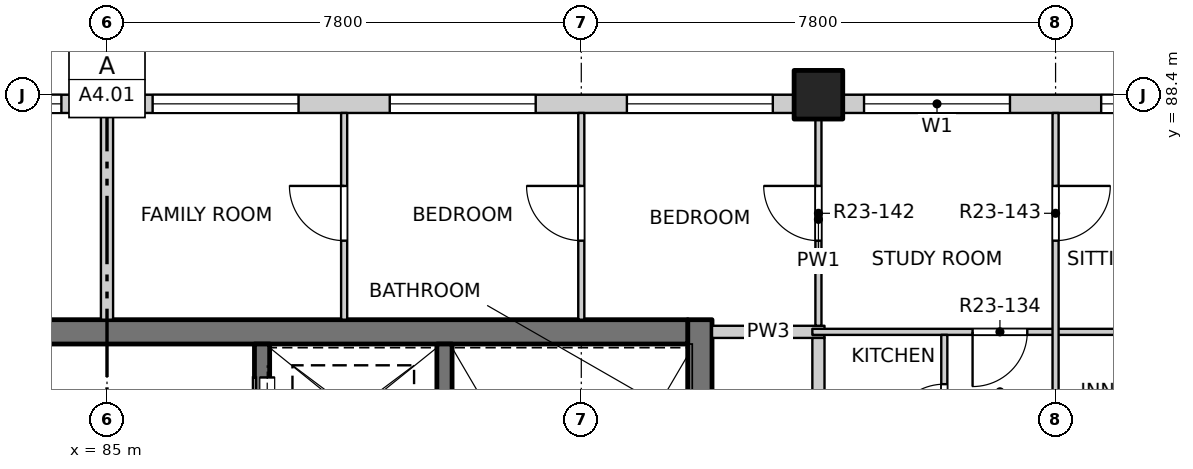
"""IFC4 building model, lengths in metres.
Left out: names, types, materials, properties, quantities, classifications, styles, units other than length and angle.
Written with IfcOpenShell. Run it as: python <this file> out.ifc"""

import sys

from ifc_helpers import new_model, si_unit, direction, frame, frame_2d, origin, origin_2d, place, context, subcontext, project, spatial, rectangle, extrude, element, fill, save


model = new_model("IFC4")
c1 = context("Model", 3, precision=1e-05, world=origin(), true_north=direction((0.0, 1.0)))
c2 = subcontext(c1, "Body", "Model", "MODEL_VIEW")
j1 = project(units=[si_unit("LENGTHUNIT", "METRE"), si_unit("PLANEANGLEUNIT", "RADIAN")], contexts=[c1])
p1 = place(None, origin())
s1 = spatial("IfcSite", under=j1, at=p1, CompositionType="ELEMENT")
p2 = place(p1, origin())
s2 = spatial("IfcBuilding", under=s1, at=p2, CompositionType="ELEMENT")
p3 = place(p2, frame((0.0, 0.0, 234.7)))
s3 = spatial("IfcBuildingStorey", under=s2, at=p3, CompositionType="ELEMENT", Elevation=234.7)
p4 = place(p3, frame((96.7, 88.4, -0.25), z_axis=(0.0, 0.0, 1.0), x_axis=(1.0, 0.0, 0.0)))
e1 = element("IfcColumn", 1, at=p4, inside=s3, PredefinedType="COLUMN", context=c2, shape_type="SweptSolid", body=[
    extrude(rectangle(XDim=0.8, YDim=0.8, at=origin_2d()), origin(), (0.0, 0.0, 1.0), 3.4),
])
p5 = place(p3, frame((94.75, 77.3, -0.25), z_axis=(0.0, 0.0, 1.0), x_axis=(0.0, 1.0, 0.0)))
e2 = element("IfcWall", 2, at=p5, inside=s3, PredefinedType="SOLIDWALL", context=c2, shape_type="SweptSolid", body=[
    extrude(rectangle(XDim=7.4, YDim=0.4, at=frame_2d((3.7, 0.0))), origin(), (0.0, 0.0, 1.0), 3.4),
])
p6 = place(p5, frame((0.3, 0.0, 0.25)))
e3 = element("IfcOpeningElement", 3, at=p6, cuts=e2, PredefinedType="OPENING", context=c2, shape_type="SweptSolid", body=[
    extrude(rectangle(XDim=1.2, YDim=2.1, at=frame_2d((0.6, 1.05))), frame((0.0, 0.21, 0.0), z_axis=(0.0, -1.0, 0.0), x_axis=(1.0, 0.0, 0.0)), (0.0, 0.0, 1.0), 0.42),
])
p7 = place(p3, frame((75.45, 84.5, -0.25), z_axis=(0.0, 0.0, 1.0), x_axis=(1.0, 0.0, 0.0)))
e4 = element("IfcWall", 4, at=p7, inside=s3, PredefinedType="SOLIDWALL", context=c2, shape_type="SweptSolid", body=[
    extrude(rectangle(XDim=19.1, YDim=0.4, at=frame_2d((9.55, 0.0))), origin(), (0.0, 0.0, 1.0), 3.4),
])
p8 = place(p3, frame((90.55, 77.3, -0.25), z_axis=(0.0, 0.0, 1.0), x_axis=(0.0, 1.0, 0.0)))
e5 = element("IfcWall", 5, at=p8, inside=s3, PredefinedType="SOLIDWALL", context=c2, shape_type="SweptSolid", body=[
    extrude(rectangle(XDim=7.0, YDim=0.25, at=frame_2d((3.5, 0.0))), origin(), (0.0, 0.0, 1.0), 3.4),
])
p9 = place(p3, frame((87.55, 82.025, -0.25), z_axis=(0.0, 0.0, 1.0), x_axis=(0.0, 1.0, 0.0)))
e6 = element("IfcWall", 6, at=p9, inside=s3, PredefinedType="SOLIDWALL", context=c2, shape_type="SweptSolid", body=[
    extrude(rectangle(XDim=2.275, YDim=0.25, at=frame_2d((1.138, 0.0))), origin(), (0.0, 0.0, 1.0), 3.4),
])
p10 = place(p9, frame((0.625, 0.0, 0.25)))
e7 = element("IfcOpeningElement", 7, at=p10, cuts=e6, PredefinedType="OPENING", context=c2, shape_type="SweptSolid", body=[
    extrude(rectangle(XDim=1.1, YDim=2.1, at=frame_2d((0.55, 1.05))), frame((0.0, 0.135, 0.0), z_axis=(0.0, -1.0, 0.0), x_axis=(1.0, 0.0, 0.0)), (0.0, 0.0, 1.0), 0.27),
])
p11 = place(p3, frame((73.7, 88.25, 0.0), z_axis=(0.0, 0.0, 1.0), x_axis=(1.0, 0.0, 0.0)))
e8 = element("IfcWall", 8, at=p11, inside=s3, PredefinedType="SOLIDWALL", context=c2, shape_type="SweptSolid", body=[
    extrude(rectangle(XDim=22.6, YDim=0.3, at=frame_2d((11.3, 0.0))), origin(), (0.0, 0.0, 1.0), 2.7),
])
p12 = place(p11, frame((0.35, 0.0, 0.9)))
e9 = element("IfcOpeningElement", 9, at=p12, cuts=e8, PredefinedType="OPENING", context=c2, shape_type="SweptSolid", body=[
    extrude(rectangle(XDim=2.4, YDim=1.8, at=frame_2d((1.2, 0.9))), frame((0.0, 0.16, 0.0), z_axis=(0.0, -1.0, 0.0), x_axis=(1.0, 0.0, 0.0)), (0.0, 0.0, 1.0), 0.32),
])
p13 = place(p11, frame((4.25, 0.0, 0.9)))
e10 = element("IfcOpeningElement", 10, at=p13, cuts=e8, PredefinedType="OPENING", context=c2, shape_type="SweptSolid", body=[
    extrude(rectangle(XDim=2.4, YDim=1.8, at=frame_2d((1.2, 0.9))), frame((0.0, 0.16, 0.0), z_axis=(0.0, -1.0, 0.0), x_axis=(1.0, 0.0, 0.0)), (0.0, 0.0, 1.0), 0.32),
])
p14 = place(p11, frame((8.15, 0.0, 0.9)))
e11 = element("IfcOpeningElement", 11, at=p14, cuts=e8, PredefinedType="OPENING", context=c2, shape_type="SweptSolid", body=[
    extrude(rectangle(XDim=2.4, YDim=1.8, at=frame_2d((1.2, 0.9))), frame((0.0, 0.16, 0.0), z_axis=(0.0, -1.0, 0.0), x_axis=(1.0, 0.0, 0.0)), (0.0, 0.0, 1.0), 0.32),
])
p15 = place(p11, frame((12.05, 0.0, 0.9)))
e12 = element("IfcOpeningElement", 12, at=p15, cuts=e8, PredefinedType="OPENING", context=c2, shape_type="SweptSolid", body=[
    extrude(rectangle(XDim=2.4, YDim=1.8, at=frame_2d((1.2, 0.9))), frame((0.0, 0.16, 0.0), z_axis=(0.0, -1.0, 0.0), x_axis=(1.0, 0.0, 0.0)), (0.0, 0.0, 1.0), 0.32),
])
p16 = place(p11, frame((15.95, 0.0, 0.9)))
e13 = element("IfcOpeningElement", 13, at=p16, cuts=e8, PredefinedType="OPENING", context=c2, shape_type="SweptSolid", body=[
    extrude(rectangle(XDim=2.4, YDim=1.8, at=frame_2d((1.2, 0.9))), frame((0.0, 0.16, 0.0), z_axis=(0.0, -1.0, 0.0), x_axis=(1.0, 0.0, 0.0)), (0.0, 0.0, 1.0), 0.32),
])
p17 = place(p11, frame((19.85, 0.0, 0.9)))
e14 = element("IfcOpeningElement", 14, at=p17, cuts=e8, PredefinedType="OPENING", context=c2, shape_type="SweptSolid", body=[
    extrude(rectangle(XDim=2.4, YDim=1.8, at=frame_2d((1.2, 0.9))), frame((0.0, 0.16, 0.0), z_axis=(0.0, -1.0, 0.0), x_axis=(1.0, 0.0, 0.0)), (0.0, 0.0, 1.0), 0.32),
])
p18 = place(p3, frame((97.1, 88.25, 0.0), z_axis=(0.0, 0.0, 1.0), x_axis=(1.0, 0.0, 0.0)))
e15 = element("IfcWall", 15, at=p18, inside=s3, PredefinedType="SOLIDWALL", context=c2, shape_type="SweptSolid", body=[
    extrude(rectangle(XDim=7.4, YDim=0.3, at=frame_2d((3.7, 0.0))), origin(), (0.0, 0.0, 1.0), 2.7),
])
p19 = place(p18, frame((0.35, 0.0, 0.9)))
e16 = element("IfcOpeningElement", 16, at=p19, cuts=e15, PredefinedType="OPENING", context=c2, shape_type="SweptSolid", body=[
    extrude(rectangle(XDim=2.4, YDim=1.8, at=frame_2d((1.2, 0.9))), frame((0.0, 0.16, 0.0), z_axis=(0.0, -1.0, 0.0), x_axis=(1.0, 0.0, 0.0)), (0.0, 0.0, 1.0), 0.32),
])
p20 = place(p18, frame((4.25, 0.0, 0.9)))
e17 = element("IfcOpeningElement", 17, at=p20, cuts=e15, PredefinedType="OPENING", context=c2, shape_type="SweptSolid", body=[
    extrude(rectangle(XDim=2.4, YDim=1.8, at=frame_2d((1.2, 0.9))), frame((0.0, 0.16, 0.0), z_axis=(0.0, -1.0, 0.0), x_axis=(1.0, 0.0, 0.0)), (0.0, 0.0, 1.0), 0.32),
])
p21 = place(p3, frame((94.95, 84.5, 0.0), z_axis=(0.0, 0.0, 1.0), x_axis=(1.0, 0.0, 0.0)))
e18 = element("IfcWall", 18, at=p21, inside=s3, PredefinedType="PARTITIONING", context=c2, shape_type="SweptSolid", body=[
    extrude(rectangle(XDim=1.85, YDim=0.2, at=frame_2d((0.925, 0.0))), origin(), (0.0, 0.0, 1.0), 3.15),
])
p22 = place(p3, frame((96.6, 84.5, 0.0), z_axis=(0.0, 0.0, 1.0), x_axis=(1.0, 0.0, 0.0)))
e19 = element("IfcWall", 19, at=p22, inside=s3, PredefinedType="PARTITIONING", context=c2, shape_type="SweptSolid", body=[
    extrude(rectangle(XDim=11.5, YDim=0.1, at=frame_2d((5.75, 0.0))), origin(), (0.0, 0.0, 1.0), 3.15),
])
p23 = place(p22, frame((2.635, 0.0, 0.0)))
e20 = element("IfcOpeningElement", 20, at=p23, cuts=e19, PredefinedType="OPENING", context=c2, shape_type="SweptSolid", body=[
    extrude(rectangle(XDim=0.9, YDim=2.1, at=frame_2d((0.45, 1.05))), frame((0.0, 0.06, 0.0), z_axis=(0.0, -1.0, 0.0), x_axis=(1.0, 0.0, 0.0)), (0.0, 0.0, 1.0), 0.12),
])
p24 = place(p3, frame((85.0, 84.7, 0.0), z_axis=(0.0, 0.0, 1.0), x_axis=(0.0, 1.0, 0.0)))
e21 = element("IfcWall", 21, at=p24, inside=s3, PredefinedType="PARTITIONING", context=c2, shape_type="SweptSolid", body=[
    extrude(rectangle(XDim=3.4, YDim=0.2, at=frame_2d((1.7, 0.0))), origin(), (0.0, 0.0, 1.0), 3.15),
])
p25 = place(p3, frame((88.9, 84.7, 0.0), z_axis=(0.0, 0.0, 1.0), x_axis=(0.0, 1.0, 0.0)))
e22 = element("IfcWall", 22, at=p25, inside=s3, PredefinedType="PARTITIONING", context=c2, shape_type="SweptSolid", body=[
    extrude(rectangle(XDim=3.4, YDim=0.1, at=frame_2d((1.7, 0.0))), origin(), (0.0, 0.0, 1.0), 3.15),
])
p26 = place(p25, frame((1.3, 0.0, 0.0)))
e23 = element("IfcOpeningElement", 23, at=p26, cuts=e22, PredefinedType="OPENING", context=c2, shape_type="SweptSolid", body=[
    extrude(rectangle(XDim=0.9, YDim=2.1, at=frame_2d((0.45, 1.05))), frame((0.0, 0.06, 0.0), z_axis=(0.0, -1.0, 0.0), x_axis=(1.0, 0.0, 0.0)), (0.0, 0.0, 1.0), 0.12),
])
p27 = place(p3, frame((92.8, 84.7, 0.0), z_axis=(0.0, 0.0, 1.0), x_axis=(0.0, 1.0, 0.0)))
e24 = element("IfcWall", 24, at=p27, inside=s3, PredefinedType="PARTITIONING", context=c2, shape_type="SweptSolid", body=[
    extrude(rectangle(XDim=3.4, YDim=0.1, at=frame_2d((1.7, 0.0))), origin(), (0.0, 0.0, 1.0), 3.15),
])
p28 = place(p27, frame((1.3, 0.0, 0.0)))
e25 = element("IfcOpeningElement", 25, at=p28, cuts=e24, PredefinedType="OPENING", context=c2, shape_type="SweptSolid", body=[
    extrude(rectangle(XDim=0.9, YDim=2.1, at=frame_2d((0.45, 1.05))), frame((0.0, 0.06, 0.0), z_axis=(0.0, -1.0, 0.0), x_axis=(1.0, 0.0, 0.0)), (0.0, 0.0, 1.0), 0.12),
])
p29 = place(p3, frame((96.7, 49.5, 0.0), z_axis=(0.0, 0.0, 1.0), x_axis=(0.0, 1.0, 0.0)))
e26 = element("IfcWall", 26, at=p29, inside=s3, PredefinedType="PARTITIONING", context=c2, shape_type="SweptSolid", body=[
    extrude(rectangle(XDim=34.9, YDim=0.2, at=frame_2d((17.45, 0.0))), origin(), (0.0, 0.0, 1.0), 3.15),
])
p30 = place(p29, frame((3.175, 0.0, 0.0)))
e27 = element("IfcOpeningElement", 27, at=p30, cuts=e26, PredefinedType="OPENING", context=c2, shape_type="SweptSolid", body=[
    extrude(rectangle(XDim=1.0, YDim=2.1, at=frame_2d((0.5, 1.05))), frame((0.0, 0.11, 0.0), z_axis=(0.0, -1.0, 0.0), x_axis=(1.0, 0.0, 0.0)), (0.0, 0.0, 1.0), 0.22),
])
p31 = place(p29, frame((14.625, 0.0, 0.0)))
e28 = element("IfcOpeningElement", 28, at=p31, cuts=e26, PredefinedType="OPENING", context=c2, shape_type="SweptSolid", body=[
    extrude(rectangle(XDim=1.0, YDim=2.1, at=frame_2d((0.5, 1.05))), frame((0.0, 0.11, 0.0), z_axis=(0.0, -1.0, 0.0), x_axis=(1.0, 0.0, 0.0)), (0.0, 0.0, 1.0), 0.22),
])
p32 = place(p29, frame((30.175, 0.0, 0.0)))
e29 = element("IfcOpeningElement", 29, at=p32, cuts=e26, PredefinedType="OPENING", context=c2, shape_type="SweptSolid", body=[
    extrude(rectangle(XDim=1.0, YDim=2.1, at=frame_2d((0.5, 1.05))), frame((0.0, 0.11, 0.0), z_axis=(0.0, -1.0, 0.0), x_axis=(1.0, 0.0, 0.0)), (0.0, 0.0, 1.0), 0.22),
])
p33 = place(p3, frame((96.7, 84.6, 0.0), z_axis=(0.0, 0.0, 1.0), x_axis=(0.0, 1.0, 0.0)))
e30 = element("IfcWall", 30, at=p33, inside=s3, PredefinedType="PARTITIONING", context=c2, shape_type="SweptSolid", body=[
    extrude(rectangle(XDim=3.5, YDim=0.1, at=frame_2d((1.75, 0.0))), origin(), (0.0, 0.0, 1.0), 3.15),
])
p34 = place(p33, frame((1.4, 0.0, 0.0)))
e31 = element("IfcOpeningElement", 31, at=p34, cuts=e30, PredefinedType="OPENING", context=c2, shape_type="SweptSolid", body=[
    extrude(rectangle(XDim=0.9, YDim=2.1, at=frame_2d((0.45, 1.05))), frame((0.0, 0.06, 0.0), z_axis=(0.0, -1.0, 0.0), x_axis=(1.0, 0.0, 0.0)), (0.0, 0.0, 1.0), 0.12),
])
p35 = place(p3, frame((98.77, 79.55, 0.0), z_axis=(0.0, 0.0, 1.0), x_axis=(0.0, 1.0, 0.0)))
e32 = element("IfcWall", 32, at=p35, inside=s3, PredefinedType="PARTITIONING", context=c2, shape_type="SweptSolid", body=[
    extrude(rectangle(XDim=4.9, YDim=0.1, at=frame_2d((2.45, 0.0))), origin(), (0.0, 0.0, 1.0), 3.15),
])
p36 = place(p35, frame((0.69, 0.0, 0.0)))
e33 = element("IfcOpeningElement", 33, at=p36, cuts=e32, PredefinedType="OPENING", context=c2, shape_type="SweptSolid", body=[
    extrude(rectangle(XDim=0.9, YDim=2.1, at=frame_2d((0.45, 1.05))), frame((0.0, 0.06, 0.0), z_axis=(0.0, -1.0, 0.0), x_axis=(1.0, 0.0, 0.0)), (0.0, 0.0, 1.0), 0.12),
])
p37 = place(p35, frame((3.19, 0.0, 0.0)))
e34 = element("IfcOpeningElement", 34, at=p37, cuts=e32, PredefinedType="OPENING", context=c2, shape_type="SweptSolid", body=[
    extrude(rectangle(XDim=0.9, YDim=2.1, at=frame_2d((0.45, 1.05))), frame((0.0, 0.06, 0.0), z_axis=(0.0, -1.0, 0.0), x_axis=(1.0, 0.0, 0.0)), (0.0, 0.0, 1.0), 0.12),
])
p38 = place(p3, frame((100.6, 41.9, 0.0), z_axis=(0.0, 0.0, 1.0), x_axis=(0.0, 1.0, 0.0)))
e35 = element("IfcWall", 35, at=p38, inside=s3, PredefinedType="PARTITIONING", context=c2, shape_type="SweptSolid", body=[
    extrude(rectangle(XDim=46.2, YDim=0.1, at=frame_2d((23.1, 0.0))), origin(), (0.0, 0.0, 1.0), 3.15),
])
p39 = place(p38, frame((1.2, 0.0, 0.0)))
e36 = element("IfcOpeningElement", 36, at=p39, cuts=e35, PredefinedType="OPENING", context=c2, shape_type="SweptSolid", body=[
    extrude(rectangle(XDim=0.9, YDim=2.1, at=frame_2d((0.45, 1.05))), frame((0.0, 0.06, 0.0), z_axis=(0.0, -1.0, 0.0), x_axis=(1.0, 0.0, 0.0)), (0.0, 0.0, 1.0), 0.12),
])
p40 = place(p38, frame((6.025, 0.0, 0.0)))
e37 = element("IfcOpeningElement", 37, at=p40, cuts=e35, PredefinedType="OPENING", context=c2, shape_type="SweptSolid", body=[
    extrude(rectangle(XDim=0.9, YDim=2.1, at=frame_2d((0.45, 1.05))), frame((0.0, 0.06, 0.0), z_axis=(0.0, -1.0, 0.0), x_axis=(1.0, 0.0, 0.0)), (0.0, 0.0, 1.0), 0.12),
])
p41 = place(p38, frame((9.975, 0.0, 0.0)))
e38 = element("IfcOpeningElement", 38, at=p41, cuts=e35, PredefinedType="OPENING", context=c2, shape_type="SweptSolid", body=[
    extrude(rectangle(XDim=0.9, YDim=2.1, at=frame_2d((0.45, 1.05))), frame((0.0, 0.06, 0.0), z_axis=(0.0, -1.0, 0.0), x_axis=(1.0, 0.0, 0.0)), (0.0, 0.0, 1.0), 0.12),
])
p42 = place(p38, frame((12.9, 0.0, 0.0)))
e39 = element("IfcOpeningElement", 39, at=p42, cuts=e35, PredefinedType="OPENING", context=c2, shape_type="SweptSolid", body=[
    extrude(rectangle(XDim=0.9, YDim=2.1, at=frame_2d((0.45, 1.05))), frame((0.0, 0.06, 0.0), z_axis=(0.0, -1.0, 0.0), x_axis=(1.0, 0.0, 0.0)), (0.0, 0.0, 1.0), 0.12),
])
p43 = place(p38, frame((17.775, 0.0, 0.0)))
e40 = element("IfcOpeningElement", 40, at=p43, cuts=e35, PredefinedType="OPENING", context=c2, shape_type="SweptSolid", body=[
    extrude(rectangle(XDim=0.9, YDim=2.1, at=frame_2d((0.45, 1.05))), frame((0.0, 0.06, 0.0), z_axis=(0.0, -1.0, 0.0), x_axis=(1.0, 0.0, 0.0)), (0.0, 0.0, 1.0), 0.12),
])
p44 = place(p38, frame((21.625, 0.0, 0.0)))
e41 = element("IfcOpeningElement", 41, at=p44, cuts=e35, PredefinedType="OPENING", context=c2, shape_type="SweptSolid", body=[
    extrude(rectangle(XDim=0.9, YDim=2.1, at=frame_2d((0.45, 1.05))), frame((0.0, 0.06, 0.0), z_axis=(0.0, -1.0, 0.0), x_axis=(1.0, 0.0, 0.0)), (0.0, 0.0, 1.0), 0.12),
])
p45 = place(p38, frame((25.575, 0.0, 0.0)))
e42 = element("IfcOpeningElement", 42, at=p45, cuts=e35, PredefinedType="OPENING", context=c2, shape_type="SweptSolid", body=[
    extrude(rectangle(XDim=0.9, YDim=2.1, at=frame_2d((0.45, 1.05))), frame((0.0, 0.06, 0.0), z_axis=(0.0, -1.0, 0.0), x_axis=(1.0, 0.0, 0.0)), (0.0, 0.0, 1.0), 0.12),
])
p46 = place(p38, frame((28.5, 0.0, 0.0)))
e43 = element("IfcOpeningElement", 43, at=p46, cuts=e35, PredefinedType="OPENING", context=c2, shape_type="SweptSolid", body=[
    extrude(rectangle(XDim=0.9, YDim=2.1, at=frame_2d((0.45, 1.05))), frame((0.0, 0.06, 0.0), z_axis=(0.0, -1.0, 0.0), x_axis=(1.0, 0.0, 0.0)), (0.0, 0.0, 1.0), 0.12),
])
p47 = place(p38, frame((33.375, 0.0, 0.0)))
e44 = element("IfcOpeningElement", 44, at=p47, cuts=e35, PredefinedType="OPENING", context=c2, shape_type="SweptSolid", body=[
    extrude(rectangle(XDim=0.9, YDim=2.1, at=frame_2d((0.45, 1.05))), frame((0.0, 0.06, 0.0), z_axis=(0.0, -1.0, 0.0), x_axis=(1.0, 0.0, 0.0)), (0.0, 0.0, 1.0), 0.12),
])
p48 = place(p38, frame((36.3, 0.0, 0.0)))
e45 = element("IfcOpeningElement", 45, at=p48, cuts=e35, PredefinedType="OPENING", context=c2, shape_type="SweptSolid", body=[
    extrude(rectangle(XDim=0.9, YDim=2.1, at=frame_2d((0.45, 1.05))), frame((0.0, 0.06, 0.0), z_axis=(0.0, -1.0, 0.0), x_axis=(1.0, 0.0, 0.0)), (0.0, 0.0, 1.0), 0.12),
])
p49 = place(p38, frame((40.2, 0.0, 0.0)))
e46 = element("IfcOpeningElement", 46, at=p49, cuts=e35, PredefinedType="OPENING", context=c2, shape_type="SweptSolid", body=[
    extrude(rectangle(XDim=0.9, YDim=2.1, at=frame_2d((0.45, 1.05))), frame((0.0, 0.06, 0.0), z_axis=(0.0, -1.0, 0.0), x_axis=(1.0, 0.0, 0.0)), (0.0, 0.0, 1.0), 0.12),
])
p50 = place(p38, frame((44.1, 0.0, 0.0)))
e47 = element("IfcOpeningElement", 47, at=p50, cuts=e35, PredefinedType="OPENING", context=c2, shape_type="SweptSolid", body=[
    extrude(rectangle(XDim=0.9, YDim=2.1, at=frame_2d((0.45, 1.05))), frame((0.0, 0.06, 0.0), z_axis=(0.0, -1.0, 0.0), x_axis=(1.0, 0.0, 0.0)), (0.0, 0.0, 1.0), 0.12),
])
p51 = place(p14, origin())
e48 = element("IfcWindow", 48, at=p51, inside=s3, PartitioningType="DOUBLE_PANEL_VERTICAL", PredefinedType="WINDOW", context=c2, shape_type="SweptSolid", body=[
    extrude(rectangle(XDim=2.4, YDim=1.8, at=frame_2d((1.2, 0.9))), frame((0.0, 0.03, 0.0), z_axis=(0.0, -1.0, 0.0), x_axis=(1.0, 0.0, 0.0)), (0.0, 0.0, 1.0), 0.06),
])
fill(e11, e48)
p52 = place(p15, origin())
e49 = element("IfcWindow", 49, at=p52, inside=s3, PartitioningType="DOUBLE_PANEL_VERTICAL", PredefinedType="WINDOW", context=c2, shape_type="SweptSolid", body=[
    extrude(rectangle(XDim=2.4, YDim=1.8, at=frame_2d((1.2, 0.9))), frame((0.0, 0.03, 0.0), z_axis=(0.0, -1.0, 0.0), x_axis=(1.0, 0.0, 0.0)), (0.0, 0.0, 1.0), 0.06),
])
fill(e12, e49)
p53 = place(p16, origin())
e50 = element("IfcWindow", 50, at=p53, inside=s3, PartitioningType="DOUBLE_PANEL_VERTICAL", PredefinedType="WINDOW", context=c2, shape_type="SweptSolid", body=[
    extrude(rectangle(XDim=2.4, YDim=1.8, at=frame_2d((1.2, 0.9))), frame((0.0, 0.03, 0.0), z_axis=(0.0, -1.0, 0.0), x_axis=(1.0, 0.0, 0.0)), (0.0, 0.0, 1.0), 0.06),
])
fill(e13, e50)
p54 = place(p17, origin())
e51 = element("IfcWindow", 51, at=p54, inside=s3, PartitioningType="DOUBLE_PANEL_VERTICAL", PredefinedType="WINDOW", context=c2, shape_type="SweptSolid", body=[
    extrude(rectangle(XDim=2.4, YDim=1.8, at=frame_2d((1.2, 0.9))), frame((0.0, 0.03, 0.0), z_axis=(0.0, -1.0, 0.0), x_axis=(1.0, 0.0, 0.0)), (0.0, 0.0, 1.0), 0.06),
])
fill(e14, e51)
p55 = place(p19, origin())
e52 = element("IfcWindow", 52, at=p55, inside=s3, PartitioningType="DOUBLE_PANEL_VERTICAL", PredefinedType="WINDOW", context=c2, shape_type="SweptSolid", body=[
    extrude(rectangle(XDim=2.4, YDim=1.8, at=frame_2d((1.2, 0.9))), frame((0.0, 0.03, 0.0), z_axis=(0.0, -1.0, 0.0), x_axis=(1.0, 0.0, 0.0)), (0.0, 0.0, 1.0), 0.06),
])
fill(e16, e52)
p56 = place(p20, origin())
e53 = element("IfcWindow", 53, at=p56, inside=s3, PartitioningType="DOUBLE_PANEL_VERTICAL", PredefinedType="WINDOW", context=c2, shape_type="SweptSolid", body=[
    extrude(rectangle(XDim=2.4, YDim=1.8, at=frame_2d((1.2, 0.9))), frame((0.0, 0.03, 0.0), z_axis=(0.0, -1.0, 0.0), x_axis=(1.0, 0.0, 0.0)), (0.0, 0.0, 1.0), 0.06),
])
fill(e17, e53)
p57 = place(p37, origin())
e54 = element("IfcDoor", 54, at=p57, inside=s3, OperationType="SINGLE_SWING_LEFT", PredefinedType="DOOR", context=c2, shape_type="SweptSolid", body=[
    extrude(rectangle(XDim=0.9, YDim=2.1, at=frame_2d((0.45, 1.05))), frame((0.0, 0.025, 0.0), z_axis=(0.0, -1.0, 0.0), x_axis=(1.0, 0.0, 0.0)), (0.0, 0.0, 1.0), 0.05),
])
fill(e34, e54)
p58 = place(p10, origin())
e55 = element("IfcDoor", 55, at=p58, inside=s3, OperationType="SLIDING_TO_RIGHT", PredefinedType="DOOR", context=c2, shape_type="SweptSolid", body=[
    extrude(rectangle(XDim=1.1, YDim=2.1, at=frame_2d((0.55, 1.05))), frame((0.0, -0.06, 0.0), z_axis=(0.0, -1.0, 0.0), x_axis=(1.0, 0.0, 0.0)), (0.0, 0.0, 1.0), 0.05),
])
fill(e7, e55)
p59 = place(p23, origin())
e56 = element("IfcDoor", 56, at=p59, inside=s3, OperationType="SINGLE_SWING_RIGHT", PredefinedType="DOOR", context=c2, shape_type="SweptSolid", body=[
    extrude(rectangle(XDim=0.9, YDim=2.1, at=frame_2d((0.45, 1.05))), frame((0.0, 0.025, 0.0), z_axis=(0.0, -1.0, 0.0), x_axis=(1.0, 0.0, 0.0)), (0.0, 0.0, 1.0), 0.05),
])
fill(e20, e56)
p60 = place(p26, origin())
e57 = element("IfcDoor", 57, at=p60, inside=s3, OperationType="SINGLE_SWING_RIGHT", PredefinedType="DOOR", context=c2, shape_type="SweptSolid", body=[
    extrude(rectangle(XDim=0.9, YDim=2.1, at=frame_2d((0.45, 1.05))), frame((0.0, 0.025, 0.0), z_axis=(0.0, -1.0, 0.0), x_axis=(1.0, 0.0, 0.0)), (0.0, 0.0, 1.0), 0.05),
])
fill(e23, e57)
p61 = place(p28, origin())
e58 = element("IfcDoor", 58, at=p61, inside=s3, OperationType="SINGLE_SWING_RIGHT", PredefinedType="DOOR", context=c2, shape_type="SweptSolid", body=[
    extrude(rectangle(XDim=0.9, YDim=2.1, at=frame_2d((0.45, 1.05))), frame((0.0, 0.025, 0.0), z_axis=(0.0, -1.0, 0.0), x_axis=(1.0, 0.0, 0.0)), (0.0, 0.0, 1.0), 0.05),
])
fill(e25, e58)
p62 = place(p34, origin())
e59 = element("IfcDoor", 59, at=p62, inside=s3, OperationType="SINGLE_SWING_RIGHT", PredefinedType="DOOR", context=c2, shape_type="SweptSolid", body=[
    extrude(rectangle(XDim=0.9, YDim=2.1, at=frame_2d((0.45, 1.05))), frame((0.0, 0.025, 0.0), z_axis=(0.0, -1.0, 0.0), x_axis=(1.0, 0.0, 0.0)), (0.0, 0.0, 1.0), 0.05),
])
fill(e31, e59)
p63 = place(p50, origin())
e60 = element("IfcDoor", 60, at=p63, inside=s3, OperationType="SINGLE_SWING_LEFT", PredefinedType="DOOR", context=c2, shape_type="SweptSolid", body=[
    extrude(rectangle(XDim=0.9, YDim=2.1, at=frame_2d((0.45, 1.05))), frame((0.0, 0.025, 0.0), z_axis=(0.0, -1.0, 0.0), x_axis=(1.0, 0.0, 0.0)), (0.0, 0.0, 1.0), 0.05),
])
fill(e47, e60)
save(model, sys.argv[1])
